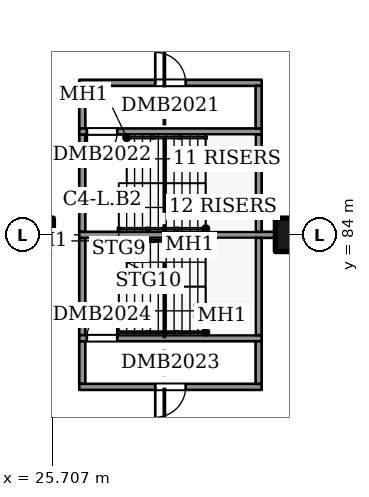
"""IFC4 building model, lengths in metres.
Left out: names, types, materials, properties, quantities, classifications, styles, units other than length and angle.
Written with IfcOpenShell. Run it as: python <this file> out.ifc"""

import sys

from ifc_helpers import new_model, si_unit, direction, frame, frame_2d, origin, origin_2d, place, context, subcontext, project, spatial, rectangle, extrude, element, fill, save


model = new_model("IFC4")
c1 = context("Model", 3, precision=1e-05, world=origin(), true_north=direction((0.0, 1.0)))
c2 = subcontext(c1, "Body", "Model", "MODEL_VIEW")
j1 = project(units=[si_unit("LENGTHUNIT", "METRE"), si_unit("PLANEANGLEUNIT", "RADIAN")], contexts=[c1])
p1 = place(None, origin())
s1 = spatial("IfcSite", under=j1, at=p1, CompositionType="ELEMENT")
p2 = place(p1, origin())
s2 = spatial("IfcBuilding", under=s1, at=p2, CompositionType="ELEMENT")
p3 = place(p2, frame((0.0, 0.0, -8.0)))
s3 = spatial("IfcBuildingStorey", under=s2, at=p3, CompositionType="ELEMENT", Elevation=-8.0)
for number, where, z_axis, x_axis in (
    (1, (25.2, 84.0, 0.0), (0.0, 0.0, 1.0), (1.0, 0.0, 0.0)),
    (2, (33.6, 84.0, 0.0), (0.0, 0.0, 1.0), (1.0, 0.0, 0.0)),
):
    element("IfcColumn", number, at=place(p3, frame(where, z_axis=z_axis, x_axis=x_axis)), inside=s3, PredefinedType="COLUMN", context=c2, shape_type="SweptSolid", body=[
        extrude(rectangle(XDim=1.1, YDim=1.1, at=origin_2d()), origin(), (0.0, 0.0, 1.0), 3.7),
    ])
p4 = place(p3, frame((26.7, 79.1, 0.0), z_axis=(0.0, 0.0, 1.0), x_axis=(0.0, 1.0, 0.0)))
e3 = element("IfcWall", 3, at=p4, inside=s3, PredefinedType="SOLIDWALL", context=c2, shape_type="SweptSolid", body=[
    extrude(rectangle(XDim=1.4, YDim=0.2, at=frame_2d((0.7, 0.0))), origin(), (0.0, 0.0, 1.0), 3.7),
])
p5 = place(p3, frame((26.6, 79.0, 0.0), z_axis=(0.0, 0.0, 1.0), x_axis=(1.0, 0.0, 0.0)))
e4 = element("IfcWall", 4, at=p5, inside=s3, PredefinedType="SOLIDWALL", context=c2, shape_type="SweptSolid", body=[
    extrude(rectangle(XDim=6.0, YDim=0.2, at=frame_2d((3.0, 0.0))), origin(), (0.0, 0.0, 1.0), 3.7),
])
p6 = place(p5, frame((2.5, 0.0, 0.0)))
e5 = element("IfcOpeningElement", 5, at=p6, cuts=e4, PredefinedType="OPENING", context=c2, shape_type="SweptSolid", body=[
    extrude(rectangle(XDim=1.0, YDim=2.1, at=frame_2d((0.5, 1.05))), frame((0.0, 0.11, 0.0), z_axis=(0.0, -1.0, 0.0), x_axis=(1.0, 0.0, 0.0)), (0.0, 0.0, 1.0), 0.22),
])
p7 = place(p3, frame((26.7, 80.7, 0.0), z_axis=(0.0, 0.0, 1.0), x_axis=(0.0, 1.0, 0.0)))
e6 = element("IfcWall", 6, at=p7, inside=s3, PredefinedType="SOLIDWALL", context=c2, shape_type="SweptSolid", body=[
    extrude(rectangle(XDim=3.2, YDim=0.2, at=frame_2d((1.6, 0.0))), origin(), (0.0, 0.0, 1.0), 3.7),
])
p8 = place(p3, frame((26.6, 80.6, 0.0), z_axis=(0.0, 0.0, 1.0), x_axis=(1.0, 0.0, 0.0)))
e7 = element("IfcWall", 7, at=p8, inside=s3, PredefinedType="SOLIDWALL", context=c2, shape_type="SweptSolid", body=[
    extrude(rectangle(XDim=6.0, YDim=0.2, at=frame_2d((3.0, 0.0))), origin(), (0.0, 0.0, 1.0), 3.7),
])
p9 = place(p8, frame((0.25, 0.0, 0.0)))
e8 = element("IfcOpeningElement", 8, at=p9, cuts=e7, PredefinedType="OPENING", context=c2, shape_type="SweptSolid", body=[
    extrude(rectangle(XDim=1.0, YDim=2.1, at=frame_2d((0.5, 1.05))), frame((0.0, 0.11, 0.0), z_axis=(0.0, -1.0, 0.0), x_axis=(1.0, 0.0, 0.0)), (0.0, 0.0, 1.0), 0.22),
])
p10 = place(p3, frame((26.7, 84.1, 0.0), z_axis=(0.0, 0.0, 1.0), x_axis=(0.0, 1.0, 0.0)))
e9 = element("IfcWall", 9, at=p10, inside=s3, PredefinedType="SOLIDWALL", context=c2, shape_type="SweptSolid", body=[
    extrude(rectangle(XDim=3.2, YDim=0.2, at=frame_2d((1.6, 0.0))), origin(), (0.0, 0.0, 1.0), 3.7),
])
p11 = place(p3, frame((26.6, 84.0, 0.0), z_axis=(0.0, 0.0, 1.0), x_axis=(1.0, 0.0, 0.0)))
e10 = element("IfcWall", 10, at=p11, inside=s3, PredefinedType="SOLIDWALL", context=c2, shape_type="SweptSolid", body=[
    extrude(rectangle(XDim=6.45, YDim=0.2, at=frame_2d((3.225, 0.0))), origin(), (0.0, 0.0, 1.0), 3.7),
])
p12 = place(p3, frame((26.7, 87.5, 0.0), z_axis=(0.0, 0.0, 1.0), x_axis=(0.0, 1.0, 0.0)))
e11 = element("IfcWall", 11, at=p12, inside=s3, PredefinedType="SOLIDWALL", context=c2, shape_type="SweptSolid", body=[
    extrude(rectangle(XDim=1.4, YDim=0.2, at=frame_2d((0.7, 0.0))), origin(), (0.0, 0.0, 1.0), 3.7),
])
p13 = place(p3, frame((26.6, 87.4, 0.0), z_axis=(0.0, 0.0, 1.0), x_axis=(1.0, 0.0, 0.0)))
e12 = element("IfcWall", 12, at=p13, inside=s3, PredefinedType="SOLIDWALL", context=c2, shape_type="SweptSolid", body=[
    extrude(rectangle(XDim=6.0, YDim=0.2, at=frame_2d((3.0, 0.0))), origin(), (0.0, 0.0, 1.0), 3.7),
])
p14 = place(p13, frame((0.25, 0.0, 0.0)))
e13 = element("IfcOpeningElement", 13, at=p14, cuts=e12, PredefinedType="OPENING", context=c2, shape_type="SweptSolid", body=[
    extrude(rectangle(XDim=1.0, YDim=2.1, at=frame_2d((0.5, 1.05))), frame((0.0, 0.11, 0.0), z_axis=(0.0, -1.0, 0.0), x_axis=(1.0, 0.0, 0.0)), (0.0, 0.0, 1.0), 0.22),
])
p15 = place(p3, frame((26.6, 89.0, 0.0), z_axis=(0.0, 0.0, 1.0), x_axis=(1.0, 0.0, 0.0)))
e14 = element("IfcWall", 14, at=p15, inside=s3, PredefinedType="SOLIDWALL", context=c2, shape_type="SweptSolid", body=[
    extrude(rectangle(XDim=6.0, YDim=0.2, at=frame_2d((3.0, 0.0))), origin(), (0.0, 0.0, 1.0), 3.7),
])
p16 = place(p15, frame((2.5, 0.0, 0.0)))
e15 = element("IfcOpeningElement", 15, at=p16, cuts=e14, PredefinedType="OPENING", context=c2, shape_type="SweptSolid", body=[
    extrude(rectangle(XDim=1.0, YDim=2.1, at=frame_2d((0.5, 1.05))), frame((0.0, 0.11, 0.0), z_axis=(0.0, -1.0, 0.0), x_axis=(1.0, 0.0, 0.0)), (0.0, 0.0, 1.0), 0.22),
])
p17 = place(p3, frame((32.5, 79.1, 0.0), z_axis=(0.0, 0.0, 1.0), x_axis=(0.0, 1.0, 0.0)))
e16 = element("IfcWall", 16, at=p17, inside=s3, PredefinedType="SOLIDWALL", context=c2, shape_type="SweptSolid", body=[
    extrude(rectangle(XDim=1.4, YDim=0.2, at=frame_2d((0.7, 0.0))), origin(), (0.0, 0.0, 1.0), 3.7),
])
for number, where, z_axis, x_axis in (
    (17, (32.5, 80.7, 0.0), (0.0, 0.0, 1.0), (0.0, 1.0, 0.0)),
    (18, (32.5, 84.1, 0.0), (0.0, 0.0, 1.0), (0.0, 1.0, 0.0)),
):
    element("IfcWall", number, at=place(p3, frame(where, z_axis=z_axis, x_axis=x_axis)), inside=s3, PredefinedType="SOLIDWALL", context=c2, shape_type="SweptSolid", body=[
        extrude(rectangle(XDim=3.2, YDim=0.2, at=frame_2d((1.6, 0.0))), origin(), (0.0, 0.0, 1.0), 3.7),
    ])
p18 = place(p3, frame((32.5, 87.5, 0.0), z_axis=(0.0, 0.0, 1.0), x_axis=(0.0, 1.0, 0.0)))
e19 = element("IfcWall", 19, at=p18, inside=s3, PredefinedType="SOLIDWALL", context=c2, shape_type="SweptSolid", body=[
    extrude(rectangle(XDim=1.4, YDim=0.2, at=frame_2d((0.7, 0.0))), origin(), (0.0, 0.0, 1.0), 3.7),
])
p19 = place(p16, origin())
e20 = element("IfcDoor", 20, at=p19, inside=s3, OperationType="SINGLE_SWING_LEFT", PredefinedType="DOOR", context=c2, shape_type="SweptSolid", body=[
    extrude(rectangle(XDim=1.0, YDim=2.1, at=frame_2d((0.5, 1.05))), frame((0.0, 0.025, 0.0), z_axis=(0.0, -1.0, 0.0), x_axis=(1.0, 0.0, 0.0)), (0.0, 0.0, 1.0), 0.05),
])
fill(e15, e20)
p20 = place(p14, frame((1.0, 0.0, 0.0), z_axis=(0.0, 0.0, 1.0), x_axis=(-1.0, 0.0, 0.0)))
e21 = element("IfcDoor", 21, at=p20, inside=s3, OperationType="SINGLE_SWING_RIGHT", PredefinedType="DOOR", context=c2, shape_type="SweptSolid", body=[
    extrude(rectangle(XDim=1.0, YDim=2.1, at=frame_2d((0.5, 1.05))), frame((0.0, 0.025, 0.0), z_axis=(0.0, -1.0, 0.0), x_axis=(1.0, 0.0, 0.0)), (0.0, 0.0, 1.0), 0.05),
])
fill(e13, e21)
p21 = place(p6, frame((1.0, 0.0, 0.0), z_axis=(0.0, 0.0, 1.0), x_axis=(-1.0, 0.0, 0.0)))
e22 = element("IfcDoor", 22, at=p21, inside=s3, OperationType="SINGLE_SWING_RIGHT", PredefinedType="DOOR", context=c2, shape_type="SweptSolid", body=[
    extrude(rectangle(XDim=1.0, YDim=2.1, at=frame_2d((0.5, 1.05))), frame((0.0, 0.025, 0.0), z_axis=(0.0, -1.0, 0.0), x_axis=(1.0, 0.0, 0.0)), (0.0, 0.0, 1.0), 0.05),
])
fill(e5, e22)
p22 = place(p9, origin())
e23 = element("IfcDoor", 23, at=p22, inside=s3, OperationType="SINGLE_SWING_RIGHT", PredefinedType="DOOR", context=c2, shape_type="SweptSolid", body=[
    extrude(rectangle(XDim=1.0, YDim=2.1, at=frame_2d((0.5, 1.05))), frame((0.0, 0.025, 0.0), z_axis=(0.0, -1.0, 0.0), x_axis=(1.0, 0.0, 0.0)), (0.0, 0.0, 1.0), 0.05),
])
fill(e8, e23)
save(model, sys.argv[1])
